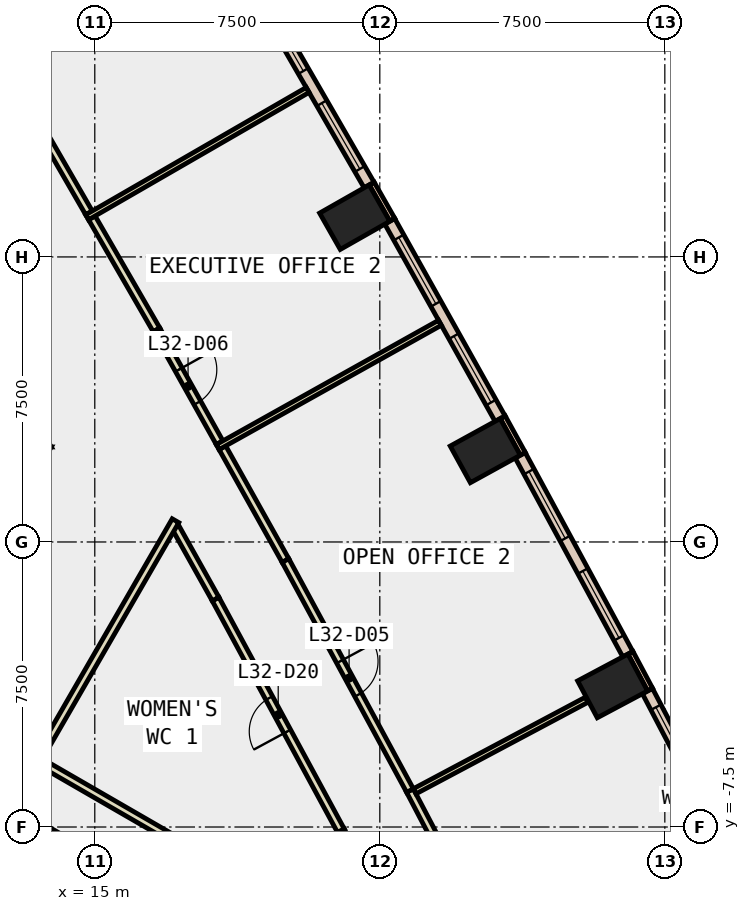
"""IFC4 building model, lengths in metres.
Left out: names, types, materials, properties, quantities, classifications, styles, units other than length and angle.
Written with IfcOpenShell. Run it as: python <this file> out.ifc"""

import sys

from ifc_helpers import new_model, si_unit, direction, frame, frame_2d, origin, origin_2d, place, context, subcontext, project, spatial, rectangle, extrude, element, fill, save


model = new_model("IFC4")
c1 = context("Model", 3, precision=1e-05, world=origin(), true_north=direction((0.0, 1.0)))
c2 = subcontext(c1, "Body", "Model", "MODEL_VIEW")
j1 = project(units=[si_unit("LENGTHUNIT", "METRE"), si_unit("PLANEANGLEUNIT", "RADIAN")], contexts=[c1])
p1 = place(None, origin())
s1 = spatial("IfcSite", under=j1, at=p1, CompositionType="ELEMENT")
p2 = place(p1, origin())
s2 = spatial("IfcBuilding", under=s1, at=p2, CompositionType="ELEMENT")
p3 = place(p2, frame((0.0, 0.0, 146.6)))
s3 = spatial("IfcBuildingStorey", under=s2, at=p3, CompositionType="ELEMENT", Elevation=146.6)
for number, where, z_axis, x_axis in (
    (1, (28.626, -3.788, -0.4), (0.0, 0.0, 1.0), (-0.47, 0.883, 0.0)),
    (2, (25.275, 2.403, -0.4), (0.0, 0.0, 1.0), (-0.482, 0.876, 0.0)),
    (3, (21.84, 8.546, -0.4), (0.0, 0.0, 1.0), (-0.494, 0.869, 0.0)),
):
    element("IfcColumn", number, at=place(p3, frame(where, z_axis=z_axis, x_axis=x_axis)), inside=s3, PredefinedType="COLUMN", context=c2, shape_type="SweptSolid", body=[
        extrude(rectangle(XDim=1.1, YDim=1.5, at=origin_2d()), origin(), (0.0, 0.0, 1.0), 4.2),
    ])
p4 = place(p3, frame((9.31, -5.375, -0.4), z_axis=(0.0, 0.0, 1.0), x_axis=(0.866017533419, -0.500013631625, 0.0)))
e4 = element("IfcWall", 4, at=p4, inside=s3, PredefinedType="SHEAR", context=c2, shape_type="SweptSolid", body=[
    extrude(rectangle(XDim=9.0, YDim=0.8, at=frame_2d((4.5, 0.0))), origin(), (0.0, 0.0, 1.0), 4.2),
])
for number, where, z_axis, x_axis in (
    (5, (29.612, -3.886, 0.0), (0.0, 0.0, 1.0), (-0.47, 0.883, 0.0)),
    (6, (26.263, 2.319, 0.0), (0.0, 0.0, 1.0), (-0.482, 0.876, 0.0)),
):
    element("IfcWall", number, at=place(p3, frame(where, z_axis=z_axis, x_axis=x_axis)), inside=s3, PredefinedType="STANDARD", context=c2, shape_type="SweptSolid", body=[
        extrude(rectangle(XDim=1.1, YDim=0.15, at=frame_2d((0.55, 0.0))), origin(), (0.0, 0.0, 1.0), 3.8),
    ])
p5 = place(p3, frame((22.83, 8.476, 0.0), z_axis=(0.0, 0.0, 1.0), x_axis=(-0.494775760346, 0.869020682708, 0.0)))
e7 = element("IfcWall", 7, at=p5, inside=s3, PredefinedType="STANDARD", context=c2, shape_type="SweptSolid", body=[
    extrude(rectangle(XDim=1.1, YDim=0.15, at=frame_2d((0.55, 0.0))), origin(), (0.0, 0.0, 1.0), 3.8),
])
p6 = place(p3, frame((32.291, -9.173, 0.0), z_axis=(0.0, 0.0, 1.0), x_axis=(-0.463809970306, 0.885934710599, 0.0)))
e8 = element("IfcWall", 8, at=p6, inside=s3, PredefinedType="STANDARD", context=c2, shape_type="SweptSolid", body=[
    extrude(rectangle(XDim=5.927, YDim=0.3, at=frame_2d((2.963, 0.0))), origin(), (0.0, 0.0, 1.0), 3.8),
])
p7 = place(p6, frame((0.482, 0.0, 0.9)))
e9 = element("IfcOpeningElement", 9, at=p7, cuts=e8, PredefinedType="OPENING", context=c2, shape_type="SweptSolid", body=[
    extrude(rectangle(XDim=2.0, YDim=2.6, at=frame_2d((1.0, 1.3))), frame((0.0, 0.16, 0.0), z_axis=(0.0, -1.0, 0.0), x_axis=(1.0, 0.0, 0.0)), (0.0, 0.0, 1.0), 0.32),
])
p8 = place(p6, frame((3.445, 0.0, 0.9)))
e10 = element("IfcOpeningElement", 10, at=p8, cuts=e8, PredefinedType="OPENING", context=c2, shape_type="SweptSolid", body=[
    extrude(rectangle(XDim=2.0, YDim=2.6, at=frame_2d((1.0, 1.3))), frame((0.0, 0.16, 0.0), z_axis=(0.0, -1.0, 0.0), x_axis=(1.0, 0.0, 0.0)), (0.0, 0.0, 1.0), 0.32),
])
p9 = place(p3, frame((29.026, -2.953, 0.0), z_axis=(0.0, 0.0, 1.0), x_axis=(-0.475794135288, 0.87955667289, 0.0)))
e11 = element("IfcWall", 11, at=p9, inside=s3, PredefinedType="STANDARD", context=c2, shape_type="SweptSolid", body=[
    extrude(rectangle(XDim=5.952, YDim=0.3, at=frame_2d((2.976, 0.0))), origin(), (0.0, 0.0, 1.0), 3.8),
])
p10 = place(p9, frame((0.488, 0.0, 0.9)))
e12 = element("IfcOpeningElement", 12, at=p10, cuts=e11, PredefinedType="OPENING", context=c2, shape_type="SweptSolid", body=[
    extrude(rectangle(XDim=2.0, YDim=2.6, at=frame_2d((1.0, 1.3))), frame((0.0, 0.16, 0.0), z_axis=(0.0, -1.0, 0.0), x_axis=(1.0, 0.0, 0.0)), (0.0, 0.0, 1.0), 0.32),
])
p11 = place(p9, frame((3.464, 0.0, 0.9)))
e13 = element("IfcOpeningElement", 13, at=p11, cuts=e11, PredefinedType="OPENING", context=c2, shape_type="SweptSolid", body=[
    extrude(rectangle(XDim=2.0, YDim=2.6, at=frame_2d((1.0, 1.3))), frame((0.0, 0.16, 0.0), z_axis=(0.0, -1.0, 0.0), x_axis=(1.0, 0.0, 0.0)), (0.0, 0.0, 1.0), 0.32),
])
p12 = place(p3, frame((25.665, 3.244, 0.0), z_axis=(0.0, 0.0, 1.0), x_axis=(-0.488009846284, 0.872838123555, 0.0)))
e14 = element("IfcWall", 14, at=p12, inside=s3, PredefinedType="STANDARD", context=c2, shape_type="SweptSolid", body=[
    extrude(rectangle(XDim=5.951, YDim=0.3, at=frame_2d((2.976, 0.0))), origin(), (0.0, 0.0, 1.0), 3.8),
])
p13 = place(p12, frame((0.488, 0.0, 0.9)))
e15 = element("IfcOpeningElement", 15, at=p13, cuts=e14, PredefinedType="OPENING", context=c2, shape_type="SweptSolid", body=[
    extrude(rectangle(XDim=2.0, YDim=2.6, at=frame_2d((1.0, 1.3))), frame((0.0, 0.16, 0.0), z_axis=(0.0, -1.0, 0.0), x_axis=(1.0, 0.0, 0.0)), (0.0, 0.0, 1.0), 0.32),
])
p14 = place(p12, frame((3.463, 0.0, 0.9)))
e16 = element("IfcOpeningElement", 16, at=p14, cuts=e14, PredefinedType="OPENING", context=c2, shape_type="SweptSolid", body=[
    extrude(rectangle(XDim=2.0, YDim=2.6, at=frame_2d((1.0, 1.3))), frame((0.0, 0.16, 0.0), z_axis=(0.0, -1.0, 0.0), x_axis=(1.0, 0.0, 0.0)), (0.0, 0.0, 1.0), 0.32),
])
p15 = place(p3, frame((22.218, 9.392, 0.0), z_axis=(0.0, 0.0, 1.0), x_axis=(-0.49994263896, 0.866058518664, 0.0)))
e17 = element("IfcWall", 17, at=p15, inside=s3, PredefinedType="STANDARD", context=c2, shape_type="SweptSolid", body=[
    extrude(rectangle(XDim=5.951, YDim=0.3, at=frame_2d((2.976, 0.0))), origin(), (0.0, 0.0, 1.0), 3.8),
])
p16 = place(p15, frame((0.488, 0.0, 0.9)))
e18 = element("IfcOpeningElement", 18, at=p16, cuts=e17, PredefinedType="OPENING", context=c2, shape_type="SweptSolid", body=[
    extrude(rectangle(XDim=2.0, YDim=2.6, at=frame_2d((1.0, 1.3))), frame((0.0, 0.16, 0.0), z_axis=(0.0, -1.0, 0.0), x_axis=(1.0, 0.0, 0.0)), (0.0, 0.0, 1.0), 0.32),
])
p17 = place(p15, frame((3.463, 0.0, 0.9)))
e19 = element("IfcOpeningElement", 19, at=p17, cuts=e17, PredefinedType="OPENING", context=c2, shape_type="SweptSolid", body=[
    extrude(rectangle(XDim=2.0, YDim=2.6, at=frame_2d((1.0, 1.3))), frame((0.0, 0.16, 0.0), z_axis=(0.0, -1.0, 0.0), x_axis=(1.0, 0.0, 0.0)), (0.0, 0.0, 1.0), 0.32),
])
p18 = place(p3, frame((22.063, -8.717, 0.0), z_axis=(0.0, 0.0, 1.0), x_axis=(-0.463776683525, 0.885952136302, 0.0)))
e20 = element("IfcWall", 20, at=p18, inside=s3, PredefinedType="PARTITIONING", context=c2, shape_type="SweptSolid", body=[
    extrude(rectangle(XDim=1.268, YDim=0.2, at=frame_2d((0.634, 0.0))), origin(), (0.0, 0.0, 1.0), 3.8),
])
p19 = place(p3, frame((21.475, -7.594, 0.0), z_axis=(0.0, 0.0, 1.0), x_axis=(-0.475918691018, 0.879489283357, 0.0)))
e21 = element("IfcWall", 21, at=p19, inside=s3, PredefinedType="PARTITIONING", context=c2, shape_type="SweptSolid", body=[
    extrude(rectangle(XDim=6.928, YDim=0.2, at=frame_2d((3.464, 0.0))), origin(), (0.0, 0.0, 1.0), 3.8),
])
p20 = place(p19, frame((2.964, 0.0, 0.0)))
e22 = element("IfcOpeningElement", 22, at=p20, cuts=e21, PredefinedType="OPENING", context=c2, shape_type="SweptSolid", body=[
    extrude(rectangle(XDim=1.0, YDim=2.1, at=frame_2d((0.5, 1.05))), frame((0.0, 0.11, 0.0), z_axis=(0.0, -1.0, 0.0), x_axis=(1.0, 0.0, 0.0)), (0.0, 0.0, 1.0), 0.22),
])
p21 = place(p3, frame((18.178, -1.501, 0.0), z_axis=(0.0, 0.0, 1.0), x_axis=(-0.487980809747, 0.872854357449, 0.0)))
e23 = element("IfcWall", 23, at=p21, inside=s3, PredefinedType="PARTITIONING", context=c2, shape_type="SweptSolid", body=[
    extrude(rectangle(XDim=2.162, YDim=0.2, at=frame_2d((1.081, 0.0))), origin(), (0.0, 0.0, 1.0), 3.8),
])
p22 = place(p3, frame((23.294, -6.541, 0.0), z_axis=(0.0, 0.0, 1.0), x_axis=(0.463802391881, -0.885938678062, 0.0)))
e24 = element("IfcWall", 24, at=p22, inside=s3, PredefinedType="PARTITIONING", context=c2, shape_type="SweptSolid", body=[
    extrude(rectangle(XDim=6.287, YDim=0.2, at=frame_2d((3.144, 0.0))), origin(), (0.0, 0.0, 1.0), 3.8),
])
p23 = place(p22, frame((2.644, 0.0, 0.0)))
e25 = element("IfcOpeningElement", 25, at=p23, cuts=e24, PredefinedType="OPENING", context=c2, shape_type="SweptSolid", body=[
    extrude(rectangle(XDim=1.0, YDim=2.1, at=frame_2d((0.5, 1.05))), frame((0.0, 0.11, 0.0), z_axis=(0.0, -1.0, 0.0), x_axis=(1.0, 0.0, 0.0)), (0.0, 0.0, 1.0), 0.22),
])
p24 = place(p3, frame((18.358, 2.481, 0.0), z_axis=(0.0, 0.0, 1.0), x_axis=(0.48792588674, -0.872885060617, 0.0)))
e26 = element("IfcWall", 26, at=p24, inside=s3, PredefinedType="PARTITIONING", context=c2, shape_type="SweptSolid", body=[
    extrude(rectangle(XDim=3.403, YDim=0.2, at=frame_2d((1.701, 0.0))), origin(), (0.0, 0.0, 1.0), 3.8),
])
p25 = place(p3, frame((20.018, -0.489, 0.0), z_axis=(0.0, 0.0, 1.0), x_axis=(0.476025981828, -0.87943121654, 0.0)))
e27 = element("IfcWall", 27, at=p25, inside=s3, PredefinedType="PARTITIONING", context=c2, shape_type="SweptSolid", body=[
    extrude(rectangle(XDim=6.882, YDim=0.2, at=frame_2d((3.441, 0.0))), origin(), (0.0, 0.0, 1.0), 3.8),
])
p26 = place(p25, frame((3.016, 0.0, 0.0)))
e28 = element("IfcOpeningElement", 28, at=p26, cuts=e27, PredefinedType="OPENING", context=c2, shape_type="SweptSolid", body=[
    extrude(rectangle(XDim=1.0, YDim=2.1, at=frame_2d((0.5, 1.05))), frame((0.0, 0.11, 0.0), z_axis=(0.0, -1.0, 0.0), x_axis=(1.0, 0.0, 0.0)), (0.0, 0.0, 1.0), 0.22),
])
p27 = place(p3, frame((14.922, 8.529, 0.0), z_axis=(0.0, 0.0, 1.0), x_axis=(0.500097109062, -0.865969330582, 0.0)))
e29 = element("IfcWall", 29, at=p27, inside=s3, PredefinedType="PARTITIONING", context=c2, shape_type="SweptSolid", body=[
    extrude(rectangle(XDim=3.403, YDim=0.2, at=frame_2d((1.702, 0.0))), origin(), (0.0, 0.0, 1.0), 3.8),
])
p28 = place(p3, frame((16.624, 5.582, 0.0), z_axis=(0.0, 0.0, 1.0), x_axis=(0.487871212611, -0.872915620152, 0.0)))
e30 = element("IfcWall", 30, at=p28, inside=s3, PredefinedType="PARTITIONING", context=c2, shape_type="SweptSolid", body=[
    extrude(rectangle(XDim=3.402, YDim=0.2, at=frame_2d((1.701, 0.0))), origin(), (0.0, 0.0, 1.0), 3.8),
])
p29 = place(p28, frame((1.202, 0.0, 0.0)))
e31 = element("IfcOpeningElement", 31, at=p29, cuts=e30, PredefinedType="OPENING", context=c2, shape_type="SweptSolid", body=[
    extrude(rectangle(XDim=1.0, YDim=2.1, at=frame_2d((0.5, 1.05))), frame((0.0, 0.11, 0.0), z_axis=(0.0, -1.0, 0.0), x_axis=(1.0, 0.0, 0.0)), (0.0, 0.0, 1.0), 0.22),
])
p30 = place(p3, frame((13.146, 11.606, 0.0), z_axis=(0.0, 0.0, 1.0), x_axis=(0.499881871653, -0.866093594476, 0.0)))
e32 = element("IfcWall", 32, at=p30, inside=s3, PredefinedType="PARTITIONING", context=c2, shape_type="SweptSolid", body=[
    extrude(rectangle(XDim=3.403, YDim=0.2, at=frame_2d((1.701, 0.0))), origin(), (0.0, 0.0, 1.0), 3.8),
])
p31 = place(p3, frame((17.124, 0.56, 0.0), z_axis=(0.0, 0.0, 1.0), x_axis=(-0.49996876383, -0.866043437245, 0.0)))
e33 = element("IfcWall", 33, at=p31, inside=s3, PredefinedType="PARTITIONING", context=c2, shape_type="SweptSolid", body=[
    extrude(rectangle(XDim=7.179, YDim=0.2, at=frame_2d((3.589, 0.0))), origin(), (0.0, 0.0, 1.0), 3.8),
])
p32 = place(p3, frame((13.485, -5.744, 0.0), z_axis=(0.0, 0.0, 1.0), x_axis=(0.865950545648, -0.500129635687, 0.0)))
e34 = element("IfcWall", 34, at=p32, inside=s3, PredefinedType="PARTITIONING", context=c2, shape_type="SweptSolid", body=[
    extrude(rectangle(XDim=9.1, YDim=0.2, at=frame_2d((4.55, 0.0))), origin(), (0.0, 0.0, 1.0), 3.8),
])
p33 = place(p3, frame((23.417, -6.56, 0.0), z_axis=(0.0, 0.0, 1.0), x_axis=(0.882784638588, 0.469777906967, 0.0)))
e35 = element("IfcWall", 35, at=p33, inside=s3, PredefinedType="PARTITIONING", context=c2, shape_type="SweptSolid", body=[
    extrude(rectangle(XDim=5.13, YDim=0.15, at=frame_2d((2.565, 0.0))), origin(), (0.0, 0.0, 1.0), 3.8),
])
p34 = place(p3, frame((18.234, 2.497, 0.0), z_axis=(0.0, 0.0, 1.0), x_axis=(0.872820235044, 0.4880418397, 0.0)))
e36 = element("IfcWall", 36, at=p34, inside=s3, PredefinedType="PARTITIONING", context=c2, shape_type="SweptSolid", body=[
    extrude(rectangle(XDim=6.7, YDim=0.15, at=frame_2d((3.35, 0.0))), origin(), (0.0, 0.0, 1.0), 3.8),
])
p35 = place(p3, frame((14.798, 8.544, 0.0), z_axis=(0.0, 0.0, 1.0), x_axis=(0.866041788654, 0.4999716195, 0.0)))
e37 = element("IfcWall", 37, at=p35, inside=s3, PredefinedType="PARTITIONING", context=c2, shape_type="SweptSolid", body=[
    extrude(rectangle(XDim=6.701, YDim=0.15, at=frame_2d((3.35, 0.0))), origin(), (0.0, 0.0, 1.0), 3.8),
])
p36 = place(p8, origin())
e38 = element("IfcWindow", 38, at=p36, inside=s3, PartitioningType="SINGLE_PANEL", PredefinedType="WINDOW", context=c2, shape_type="SweptSolid", body=[
    extrude(rectangle(XDim=2.0, YDim=2.6, at=frame_2d((1.0, 1.3))), frame((0.0, 0.03, 0.0), z_axis=(0.0, -1.0, 0.0), x_axis=(1.0, 0.0, 0.0)), (0.0, 0.0, 1.0), 0.06),
])
fill(e10, e38)
p37 = place(p10, origin())
e39 = element("IfcWindow", 39, at=p37, inside=s3, PartitioningType="SINGLE_PANEL", PredefinedType="WINDOW", context=c2, shape_type="SweptSolid", body=[
    extrude(rectangle(XDim=2.0, YDim=2.6, at=frame_2d((1.0, 1.3))), frame((0.0, 0.03, 0.0), z_axis=(0.0, -1.0, 0.0), x_axis=(1.0, 0.0, 0.0)), (0.0, 0.0, 1.0), 0.06),
])
fill(e12, e39)
p38 = place(p11, origin())
e40 = element("IfcWindow", 40, at=p38, inside=s3, PartitioningType="SINGLE_PANEL", PredefinedType="WINDOW", context=c2, shape_type="SweptSolid", body=[
    extrude(rectangle(XDim=2.0, YDim=2.6, at=frame_2d((1.0, 1.3))), frame((0.0, 0.03, 0.0), z_axis=(0.0, -1.0, 0.0), x_axis=(1.0, 0.0, 0.0)), (0.0, 0.0, 1.0), 0.06),
])
fill(e13, e40)
p39 = place(p13, origin())
e41 = element("IfcWindow", 41, at=p39, inside=s3, PartitioningType="SINGLE_PANEL", PredefinedType="WINDOW", context=c2, shape_type="SweptSolid", body=[
    extrude(rectangle(XDim=2.0, YDim=2.6, at=frame_2d((1.0, 1.3))), frame((0.0, 0.03, 0.0), z_axis=(0.0, -1.0, 0.0), x_axis=(1.0, 0.0, 0.0)), (0.0, 0.0, 1.0), 0.06),
])
fill(e15, e41)
p40 = place(p14, origin())
e42 = element("IfcWindow", 42, at=p40, inside=s3, PartitioningType="SINGLE_PANEL", PredefinedType="WINDOW", context=c2, shape_type="SweptSolid", body=[
    extrude(rectangle(XDim=2.0, YDim=2.6, at=frame_2d((1.0, 1.3))), frame((0.0, 0.03, 0.0), z_axis=(0.0, -1.0, 0.0), x_axis=(1.0, 0.0, 0.0)), (0.0, 0.0, 1.0), 0.06),
])
fill(e16, e42)
p41 = place(p16, origin())
e43 = element("IfcWindow", 43, at=p41, inside=s3, PartitioningType="SINGLE_PANEL", PredefinedType="WINDOW", context=c2, shape_type="SweptSolid", body=[
    extrude(rectangle(XDim=2.0, YDim=2.6, at=frame_2d((1.0, 1.3))), frame((0.0, 0.03, 0.0), z_axis=(0.0, -1.0, 0.0), x_axis=(1.0, 0.0, 0.0)), (0.0, 0.0, 1.0), 0.06),
])
fill(e18, e43)
p42 = place(p17, origin())
e44 = element("IfcWindow", 44, at=p42, inside=s3, PartitioningType="SINGLE_PANEL", PredefinedType="WINDOW", context=c2, shape_type="SweptSolid", body=[
    extrude(rectangle(XDim=2.0, YDim=2.6, at=frame_2d((1.0, 1.3))), frame((0.0, 0.03, 0.0), z_axis=(0.0, -1.0, 0.0), x_axis=(1.0, 0.0, 0.0)), (0.0, 0.0, 1.0), 0.06),
])
fill(e19, e44)
p43 = place(p26, origin())
e45 = element("IfcDoor", 45, at=p43, inside=s3, OperationType="SINGLE_SWING_LEFT", PredefinedType="DOOR", context=c2, shape_type="SweptSolid", body=[
    extrude(rectangle(XDim=1.0, YDim=2.1, at=frame_2d((0.5, 1.05))), frame((0.0, 0.025, 0.0), z_axis=(0.0, -1.0, 0.0), x_axis=(1.0, 0.0, 0.0)), (0.0, 0.0, 1.0), 0.05),
])
fill(e28, e45)
p44 = place(p29, origin())
e46 = element("IfcDoor", 46, at=p44, inside=s3, OperationType="SINGLE_SWING_LEFT", PredefinedType="DOOR", context=c2, shape_type="SweptSolid", body=[
    extrude(rectangle(XDim=1.0, YDim=2.1, at=frame_2d((0.5, 1.05))), frame((0.0, 0.025, 0.0), z_axis=(0.0, -1.0, 0.0), x_axis=(1.0, 0.0, 0.0)), (0.0, 0.0, 1.0), 0.05),
])
fill(e31, e46)
p45 = place(p20, origin())
e47 = element("IfcDoor", 47, at=p45, inside=s3, OperationType="SINGLE_SWING_LEFT", PredefinedType="DOOR", context=c2, shape_type="SweptSolid", body=[
    extrude(rectangle(XDim=1.0, YDim=2.1, at=frame_2d((0.5, 1.05))), frame((0.0, 0.025, 0.0), z_axis=(0.0, -1.0, 0.0), x_axis=(1.0, 0.0, 0.0)), (0.0, 0.0, 1.0), 0.05),
])
fill(e22, e47)
save(model, sys.argv[1])
